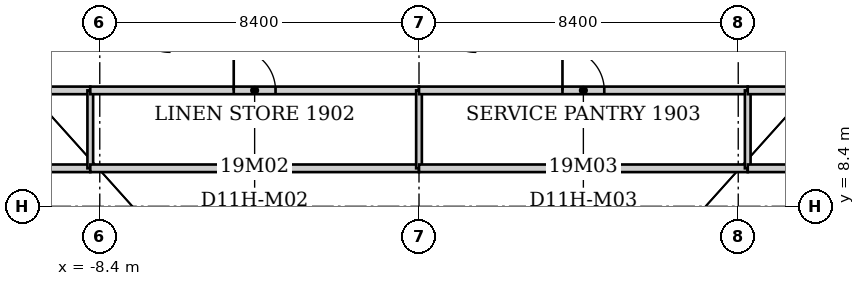
"""IFC4 building model, lengths in metres.
Left out: names, types, materials, properties, quantities, classifications, styles, units other than length and angle.
Written with IfcOpenShell. Run it as: python <this file> out.ifc"""

import sys

from ifc_helpers import new_model, si_unit, direction, frame, frame_2d, origin, place, context, subcontext, project, spatial, rectangle, extrude, element, fill, save


model = new_model("IFC4")
c1 = context("Model", 3, precision=1e-05, world=origin(), true_north=direction((0.0, 1.0)))
c2 = subcontext(c1, "Body", "Model", "MODEL_VIEW")
j1 = project(units=[si_unit("LENGTHUNIT", "METRE"), si_unit("PLANEANGLEUNIT", "RADIAN")], contexts=[c1])
p1 = place(None, origin())
s1 = spatial("IfcSite", under=j1, at=p1, CompositionType="ELEMENT")
p2 = place(p1, origin())
s2 = spatial("IfcBuilding", under=s1, at=p2, CompositionType="ELEMENT")
p3 = place(p2, frame((0.0, 0.0, 80.0)))
s3 = spatial("IfcBuildingStorey", under=s2, at=p3, CompositionType="ELEMENT", Elevation=80.0)
p4 = place(p3, frame((-12.46, 11.45, 0.0), z_axis=(0.0, 0.0, 1.0), x_axis=(1.0, 0.0, 0.0)))
e1 = element("IfcWall", 1, at=p4, inside=s3, PredefinedType="PARTITIONING", context=c2, shape_type="SweptSolid", body=[
    extrude(rectangle(XDim=3.81, YDim=0.2, at=frame_2d((1.905, 0.0))), origin(), (0.0, 0.0, 1.0), 3.64),
])
p5 = place(p3, frame((-8.65, 9.4, 0.0), z_axis=(0.0, 0.0, 1.0), x_axis=(-1.0, 0.0, 0.0)))
e2 = element("IfcWall", 2, at=p5, inside=s3, PredefinedType="PARTITIONING", context=c2, shape_type="SweptSolid", body=[
    extrude(rectangle(XDim=2.39, YDim=0.2, at=frame_2d((1.195, 0.0))), origin(), (0.0, 0.0, 1.0), 3.64),
])
p6 = place(p3, frame((-8.65, 11.45, 0.0), z_axis=(0.0, 0.0, 1.0), x_axis=(0.0, -1.0, 0.0)))
e3 = element("IfcWall", 3, at=p6, inside=s3, PredefinedType="PARTITIONING", context=c2, shape_type="SweptSolid", body=[
    extrude(rectangle(XDim=2.05, YDim=0.15, at=frame_2d((1.025, 0.0))), origin(), (0.0, 0.0, 1.0), 3.64),
])
p7 = place(p3, frame((-8.65, 11.45, 0.0), z_axis=(0.0, 0.0, 1.0), x_axis=(1.0, 0.0, 0.0)))
e4 = element("IfcWall", 4, at=p7, inside=s3, PredefinedType="PARTITIONING", context=c2, shape_type="SweptSolid", body=[
    extrude(rectangle(XDim=8.65, YDim=0.2, at=frame_2d((4.325, 0.0))), origin(), (0.0, 0.0, 1.0), 3.64),
])
p8 = place(p7, frame((3.775, 0.0, 0.0)))
e5 = element("IfcOpeningElement", 5, at=p8, cuts=e4, PredefinedType="OPENING", context=c2, shape_type="SweptSolid", body=[
    extrude(rectangle(XDim=1.1, YDim=2.2, at=frame_2d((0.55, 1.1))), frame((0.0, 0.1, 0.0), z_axis=(0.0, -1.0, 0.0), x_axis=(1.0, 0.0, 0.0)), (0.0, 0.0, 1.0), 0.2),
])
p9 = place(p3, frame((0.0, 9.4, 0.0), z_axis=(0.0, 0.0, 1.0), x_axis=(-1.0, 0.0, 0.0)))
e6 = element("IfcWall", 6, at=p9, inside=s3, PredefinedType="PARTITIONING", context=c2, shape_type="SweptSolid", body=[
    extrude(rectangle(XDim=8.65, YDim=0.2, at=frame_2d((4.325, 0.0))), origin(), (0.0, 0.0, 1.0), 3.64),
])
p10 = place(p3, frame((0.0, 11.45, 0.0), z_axis=(0.0, 0.0, 1.0), x_axis=(0.0, -1.0, 0.0)))
e7 = element("IfcWall", 7, at=p10, inside=s3, PredefinedType="PARTITIONING", context=c2, shape_type="SweptSolid", body=[
    extrude(rectangle(XDim=2.05, YDim=0.15, at=frame_2d((1.025, 0.0))), origin(), (0.0, 0.0, 1.0), 2.878),
])
p11 = place(p3, frame((0.0, 11.45, 0.0), z_axis=(0.0, 0.0, 1.0), x_axis=(1.0, 0.0, 0.0)))
e8 = element("IfcWall", 8, at=p11, inside=s3, PredefinedType="PARTITIONING", context=c2, shape_type="SweptSolid", body=[
    extrude(rectangle(XDim=8.65, YDim=0.2, at=frame_2d((4.325, 0.0))), origin(), (0.0, 0.0, 1.0), 3.64),
])
p12 = place(p11, frame((3.775, 0.0, 0.0)))
e9 = element("IfcOpeningElement", 9, at=p12, cuts=e8, PredefinedType="OPENING", context=c2, shape_type="SweptSolid", body=[
    extrude(rectangle(XDim=1.1, YDim=2.2, at=frame_2d((0.55, 1.1))), frame((0.0, 0.1, 0.0), z_axis=(0.0, -1.0, 0.0), x_axis=(1.0, 0.0, 0.0)), (0.0, 0.0, 1.0), 0.2),
])
p13 = place(p3, frame((8.65, 9.4, 0.0), z_axis=(0.0, 0.0, 1.0), x_axis=(-1.0, 0.0, 0.0)))
e10 = element("IfcWall", 10, at=p13, inside=s3, PredefinedType="PARTITIONING", context=c2, shape_type="SweptSolid", body=[
    extrude(rectangle(XDim=8.65, YDim=0.2, at=frame_2d((4.325, 0.0))), origin(), (0.0, 0.0, 1.0), 3.64),
])
p14 = place(p3, frame((8.65, 11.45, 0.0), z_axis=(0.0, 0.0, 1.0), x_axis=(0.0, -1.0, 0.0)))
e11 = element("IfcWall", 11, at=p14, inside=s3, PredefinedType="PARTITIONING", context=c2, shape_type="SweptSolid", body=[
    extrude(rectangle(XDim=2.05, YDim=0.15, at=frame_2d((1.025, 0.0))), origin(), (0.0, 0.0, 1.0), 3.64),
])
p15 = place(p3, frame((8.65, 11.45, 0.0), z_axis=(0.0, 0.0, 1.0), x_axis=(1.0, 0.0, 0.0)))
e12 = element("IfcWall", 12, at=p15, inside=s3, PredefinedType="PARTITIONING", context=c2, shape_type="SweptSolid", body=[
    extrude(rectangle(XDim=3.81, YDim=0.2, at=frame_2d((1.905, 0.0))), origin(), (0.0, 0.0, 1.0), 3.64),
])
p16 = place(p3, frame((11.04, 9.4, 0.0), z_axis=(0.0, 0.0, 1.0), x_axis=(-1.0, 0.0, 0.0)))
e13 = element("IfcWall", 13, at=p16, inside=s3, PredefinedType="PARTITIONING", context=c2, shape_type="SweptSolid", body=[
    extrude(rectangle(XDim=2.39, YDim=0.2, at=frame_2d((1.195, 0.0))), origin(), (0.0, 0.0, 1.0), 3.64),
])
p17 = place(p8, origin())
e14 = element("IfcDoor", 14, at=p17, inside=s3, OperationType="SINGLE_SWING_LEFT", PredefinedType="DOOR", context=c2, shape_type="SweptSolid", body=[
    extrude(rectangle(XDim=1.1, YDim=2.2, at=frame_2d((0.55, 1.1))), frame((0.0, 0.025, 0.0), z_axis=(0.0, -1.0, 0.0), x_axis=(1.0, 0.0, 0.0)), (0.0, 0.0, 1.0), 0.05),
])
fill(e5, e14)
p18 = place(p12, origin())
e15 = element("IfcDoor", 15, at=p18, inside=s3, OperationType="SINGLE_SWING_LEFT", PredefinedType="DOOR", context=c2, shape_type="SweptSolid", body=[
    extrude(rectangle(XDim=1.1, YDim=2.2, at=frame_2d((0.55, 1.1))), frame((0.0, 0.025, 0.0), z_axis=(0.0, -1.0, 0.0), x_axis=(1.0, 0.0, 0.0)), (0.0, 0.0, 1.0), 0.05),
])
fill(e9, e15)
save(model, sys.argv[1])
